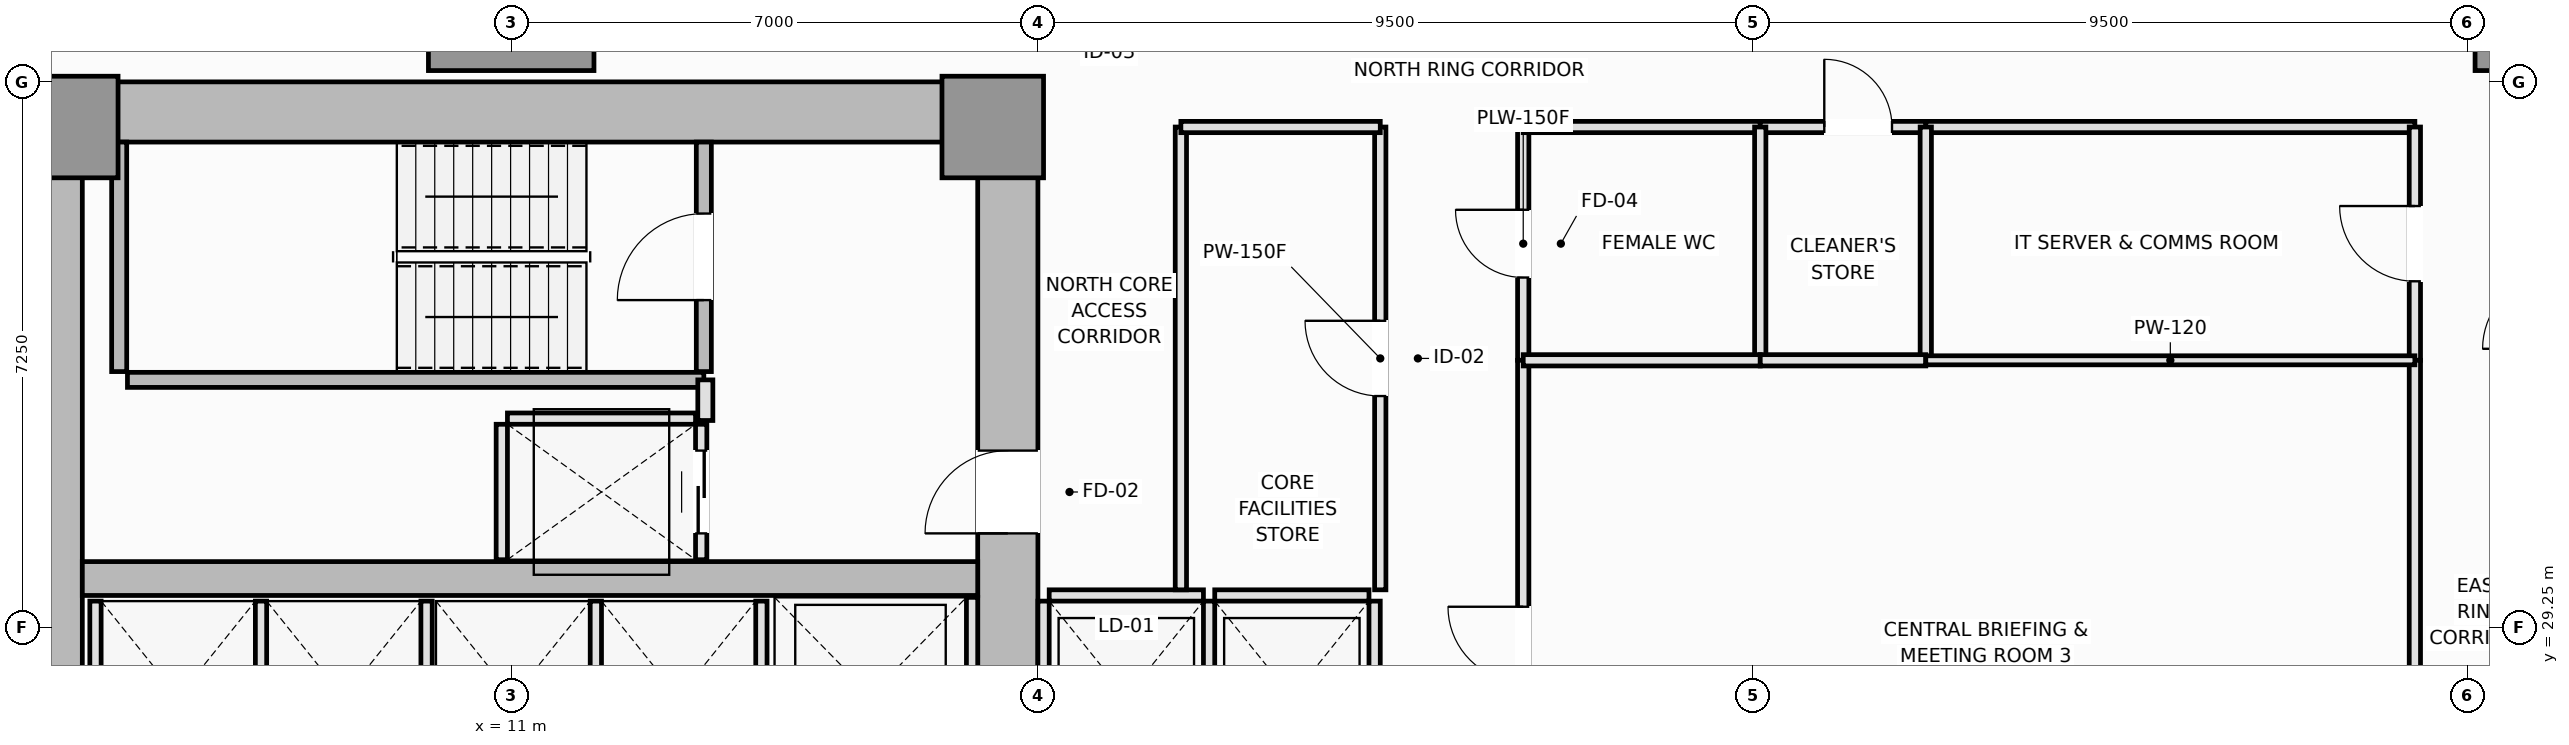
"""IFC4 building model, lengths in metres.
Left out: names, types, materials, properties, quantities, classifications, styles, units other than length and angle.
Written with IfcOpenShell. Run it as: python <this file> out.ifc"""

import sys

from ifc_helpers import new_model, si_unit, direction, frame, frame_2d, origin, origin_2d, place, context, subcontext, project, spatial, rectangle, extrude, element, fill, save


model = new_model("IFC4")
c1 = context("Model", 3, precision=1e-05, world=origin(), true_north=direction((0.0, 1.0)))
c2 = subcontext(c1, "Body", "Model", "MODEL_VIEW")
j1 = project(units=[si_unit("LENGTHUNIT", "METRE"), si_unit("PLANEANGLEUNIT", "RADIAN")], contexts=[c1])
p1 = place(None, origin())
s1 = spatial("IfcSite", under=j1, at=p1, CompositionType="ELEMENT")
p2 = place(p1, origin())
s2 = spatial("IfcBuilding", under=s1, at=p2, CompositionType="ELEMENT")
p3 = place(p2, frame((0.0, 0.0, 64.65)))
s3 = spatial("IfcBuildingStorey", under=s2, at=p3, CompositionType="ELEMENT", Elevation=64.65)
p4 = place(p3, frame((4.5, 36.1, 0.0), z_axis=(0.0, 0.0, 1.0), x_axis=(1.0, 0.0, 0.0)))
e1 = element("IfcWall", 1, at=p4, inside=s3, PredefinedType="SHEAR", context=c2, shape_type="SweptSolid", body=[
    extrude(rectangle(XDim=13.5, YDim=0.8, at=frame_2d((6.75, 0.0))), origin(), (0.0, 0.0, 1.0), 3.55),
])
p5 = place(p3, frame((4.9, 14.8, 0.0), z_axis=(0.0, 0.0, 1.0), x_axis=(0.0, 1.0, 0.0)))
e2 = element("IfcWall", 2, at=p5, inside=s3, PredefinedType="SHEAR", context=c2, shape_type="SweptSolid", body=[
    extrude(rectangle(XDim=20.9, YDim=0.8, at=frame_2d((10.45, 0.0))), origin(), (0.0, 0.0, 1.0), 3.55),
])
p6 = place(p3, frame((17.6, 27.05, 0.0), z_axis=(0.0, 0.0, 1.0), x_axis=(0.0, 1.0, 0.0)))
e3 = element("IfcWall", 3, at=p6, inside=s3, PredefinedType="SHEAR", context=c2, shape_type="SweptSolid", body=[
    extrude(rectangle(XDim=8.65, YDim=0.8, at=frame_2d((4.325, 0.0))), origin(), (0.0, 0.0, 1.0), 3.55),
])
p7 = place(p6, frame((3.45, 0.0, 0.0)))
e4 = element("IfcOpeningElement", 4, at=p7, cuts=e3, PredefinedType="OPENING", context=c2, shape_type="SweptSolid", body=[
    extrude(rectangle(XDim=1.1, YDim=2.15, at=frame_2d((0.55, 1.075))), frame((0.0, 0.41, 0.0), z_axis=(0.0, -1.0, 0.0), x_axis=(1.0, 0.0, 0.0)), (0.0, 0.0, 1.0), 0.82),
])
p8 = place(p3, frame((5.3, 29.9, 0.0), z_axis=(0.0, 0.0, 1.0), x_axis=(1.0, 0.0, 0.0)))
e5 = element("IfcWall", 5, at=p8, inside=s3, PredefinedType="SHEAR", context=c2, shape_type="SweptSolid", body=[
    extrude(rectangle(XDim=11.9, YDim=0.45, at=frame_2d((5.95, 0.0))), origin(), (0.0, 0.0, 1.0), 3.55),
])
for number, where, z_axis, x_axis in (
    (6, (5.1, 35.9, 0.0), (0.0, 0.0, 1.0), (1.0, 0.0, 0.0)),
    (7, (17.4, 35.9, 0.0), (0.0, 0.0, 1.0), (1.0, 0.0, 0.0)),
):
    element("IfcColumn", number, at=place(p3, frame(where, z_axis=z_axis, x_axis=x_axis)), inside=s3, PredefinedType="PILASTER", context=c2, shape_type="SweptSolid", body=[
        extrude(rectangle(XDim=1.35, YDim=1.35, at=origin_2d()), origin(), (0.0, 0.0, 1.0), 3.55),
    ])
for number, where, z_axis, x_axis in (
    (8, (11.0, 37.75, 0.0), (0.0, 0.0, 1.0), (1.0, 0.0, 0.0)),
    (9, (38.2, 37.75, 0.0), (0.0, 0.0, 1.0), (1.0, 0.0, 0.0)),
):
    element("IfcColumn", number, at=place(p3, frame(where, z_axis=z_axis, x_axis=x_axis)), inside=s3, PredefinedType="COLUMN", context=c2, shape_type="SweptSolid", body=[
        extrude(rectangle(XDim=2.2, YDim=2.2, at=origin_2d()), origin(), (0.0, 0.0, 1.0), 3.55),
    ])
p9 = place(p3, frame((5.79, 32.65, 0.0), z_axis=(0.0, 0.0, 1.0), x_axis=(0.0, 1.0, 0.0)))
e10 = element("IfcWall", 10, at=p9, inside=s3, PredefinedType="SOLIDWALL", context=c2, shape_type="SweptSolid", body=[
    extrude(rectangle(XDim=3.05, YDim=0.2, at=frame_2d((1.525, 0.0))), origin(), (0.0, 0.0, 1.0), 3.55),
])
p10 = place(p3, frame((5.9, 32.54, 0.0), z_axis=(0.0, 0.0, 1.0), x_axis=(1.0, 0.0, 0.0)))
e11 = element("IfcWall", 11, at=p10, inside=s3, PredefinedType="SOLIDWALL", context=c2, shape_type="SweptSolid", body=[
    extrude(rectangle(XDim=7.66, YDim=0.2, at=frame_2d((3.83, 0.0))), origin(), (0.0, 0.0, 1.0), 3.55),
])
p11 = place(p3, frame((13.56, 32.65, 0.0), z_axis=(0.0, 0.0, 1.0), x_axis=(0.0, 1.0, 0.0)))
e12 = element("IfcWall", 12, at=p11, inside=s3, PredefinedType="SOLIDWALL", context=c2, shape_type="SweptSolid", body=[
    extrude(rectangle(XDim=3.05, YDim=0.2, at=frame_2d((1.525, 0.0))), origin(), (0.0, 0.0, 1.0), 3.55),
])
p12 = place(p11, frame((0.95, 0.0, 0.0)))
e13 = element("IfcOpeningElement", 13, at=p12, cuts=e12, PredefinedType="OPENING", context=c2, shape_type="SweptSolid", body=[
    extrude(rectangle(XDim=1.15, YDim=2.15, at=frame_2d((0.575, 1.075))), frame((0.0, 0.11, 0.0), z_axis=(0.0, -1.0, 0.0), x_axis=(1.0, 0.0, 0.0)), (0.0, 0.0, 1.0), 0.22),
])
p13 = place(p3, frame((18.15, 29.675, 0.0), z_axis=(0.0, 0.0, 1.0), x_axis=(1.0, 0.0, 0.0)))
e14 = element("IfcWall", 14, at=p13, inside=s3, PredefinedType="PARTITIONING", context=c2, shape_type="SweptSolid", body=[
    extrude(rectangle(XDim=2.05, YDim=0.15, at=frame_2d((1.025, 0.0))), origin(), (0.0, 0.0, 1.0), 3.37),
])
for number, where, z_axis, x_axis in (
    (15, (18.075, 27.05, 0.0), (0.0, 0.0, 1.0), (0.0, 1.0, 0.0)),
    (16, (20.275, 27.05, 0.0), (0.0, 0.0, 1.0), (0.0, 1.0, 0.0)),
):
    element("IfcWall", number, at=place(p3, frame(where, z_axis=z_axis, x_axis=x_axis)), inside=s3, PredefinedType="PARTITIONING", context=c2, shape_type="SweptSolid", body=[
        extrude(rectangle(XDim=2.55, YDim=0.15, at=frame_2d((1.275, 0.0))), origin(), (0.0, 0.0, 1.0), 3.37),
    ])
p14 = place(p3, frame((20.35, 29.675, 0.0), z_axis=(0.0, 0.0, 1.0), x_axis=(1.0, 0.0, 0.0)))
e17 = element("IfcWall", 17, at=p14, inside=s3, PredefinedType="PARTITIONING", context=c2, shape_type="SweptSolid", body=[
    extrude(rectangle(XDim=2.05, YDim=0.15, at=frame_2d((1.025, 0.0))), origin(), (0.0, 0.0, 1.0), 3.37),
])
for number, where, z_axis, x_axis in (
    (18, (22.475, 27.05, 0.0), (0.0, 0.0, 1.0), (0.0, 1.0, 0.0)),
    (19, (5.475, 27.05, 0.0), (0.0, 0.0, 1.0), (0.0, 1.0, 0.0)),
    (20, (7.675, 27.05, 0.0), (0.0, 0.0, 1.0), (0.0, 1.0, 0.0)),
    (21, (9.875, 27.05, 0.0), (0.0, 0.0, 1.0), (0.0, 1.0, 0.0)),
    (22, (12.125, 27.05, 0.0), (0.0, 0.0, 1.0), (0.0, 1.0, 0.0)),
    (23, (14.325, 27.05, 0.0), (0.0, 0.0, 1.0), (0.0, 1.0, 0.0)),
):
    element("IfcWall", number, at=place(p3, frame(where, z_axis=z_axis, x_axis=x_axis)), inside=s3, PredefinedType="PARTITIONING", context=c2, shape_type="SweptSolid", body=[
        extrude(rectangle(XDim=2.55, YDim=0.15, at=frame_2d((1.275, 0.0))), origin(), (0.0, 0.0, 1.0), 3.37),
    ])
p15 = place(p3, frame((17.125, 27.05, 0.0), z_axis=(0.0, 0.0, 1.0), x_axis=(0.0, 1.0, 0.0)))
e24 = element("IfcWall", 24, at=p15, inside=s3, PredefinedType="PARTITIONING", context=c2, shape_type="SweptSolid", body=[
    extrude(rectangle(XDim=2.6, YDim=0.15, at=frame_2d((1.3, 0.0))), origin(), (0.0, 0.0, 1.0), 3.37),
])
p16 = place(p3, frame((10.95, 32.025, 0.0), z_axis=(0.0, 0.0, 1.0), x_axis=(1.0, 0.0, 0.0)))
e25 = element("IfcWall", 25, at=p16, inside=s3, PredefinedType="PARTITIONING", context=c2, shape_type="SweptSolid", body=[
    extrude(rectangle(XDim=2.5, YDim=0.15, at=frame_2d((1.25, 0.0))), origin(), (0.0, 0.0, 1.0), 3.37),
])
p17 = place(p3, frame((10.875, 30.15, 0.0), z_axis=(0.0, 0.0, 1.0), x_axis=(0.0, 1.0, 0.0)))
e26 = element("IfcWall", 26, at=p17, inside=s3, PredefinedType="PARTITIONING", context=c2, shape_type="SweptSolid", body=[
    extrude(rectangle(XDim=1.8, YDim=0.15, at=frame_2d((0.9, 0.0))), origin(), (0.0, 0.0, 1.0), 3.37),
])
p18 = place(p3, frame((13.525, 30.15, 0.0), z_axis=(0.0, 0.0, 1.0), x_axis=(0.0, 1.0, 0.0)))
e27 = element("IfcWall", 27, at=p18, inside=s3, PredefinedType="PARTITIONING", context=c2, shape_type="SweptSolid", body=[
    extrude(rectangle(XDim=1.8, YDim=0.15, at=frame_2d((0.9, 0.0))), origin(), (0.0, 0.0, 1.0), 3.37),
])
p19 = place(p18, frame((0.35, 0.0, 0.0)))
e28 = element("IfcOpeningElement", 28, at=p19, cuts=e27, PredefinedType="OPENING", context=c2, shape_type="SweptSolid", body=[
    extrude(rectangle(XDim=1.1, YDim=2.2, at=frame_2d((0.55, 1.1))), frame((0.0, 0.085, 0.0), z_axis=(0.0, -1.0, 0.0), x_axis=(1.0, 0.0, 0.0)), (0.0, 0.0, 1.0), 0.17),
])
p20 = place(p3, frame((13.58, 32.0, 0.0), z_axis=(0.0, 0.0, 1.0), x_axis=(0.0, 1.0, 0.0)))
e29 = element("IfcWall", 29, at=p20, inside=s3, PredefinedType="PARTITIONING", context=c2, shape_type="SweptSolid", body=[
    extrude(rectangle(XDim=0.54, YDim=0.2, at=frame_2d((0.27, 0.0))), origin(), (0.0, 0.0, 1.0), 3.37),
])
p21 = place(p3, frame((22.55, 29.75, 0.0), z_axis=(0.0, 0.0, 1.0), x_axis=(0.0, 1.0, 0.0)))
e30 = element("IfcWall", 30, at=p21, inside=s3, PredefinedType="PARTITIONING", context=c2, shape_type="SweptSolid", body=[
    extrude(rectangle(XDim=6.15, YDim=0.15, at=frame_2d((3.075, 0.0))), origin(), (0.0, 0.0, 1.0), 3.01),
])
p22 = place(p21, frame((2.575, 0.0, 0.0)))
e31 = element("IfcOpeningElement", 31, at=p22, cuts=e30, PredefinedType="OPENING", context=c2, shape_type="SweptSolid", body=[
    extrude(rectangle(XDim=1.0, YDim=2.15, at=frame_2d((0.5, 1.075))), frame((0.0, 0.085, 0.0), z_axis=(0.0, -1.0, 0.0), x_axis=(1.0, 0.0, 0.0)), (0.0, 0.0, 1.0), 0.17),
])
p23 = place(p3, frame((24.45, 32.8, 0.0), z_axis=(0.0, 0.0, 1.0), x_axis=(0.0, 1.0, 0.0)))
e32 = element("IfcWall", 32, at=p23, inside=s3, PredefinedType="PLUMBINGWALL", context=c2, shape_type="SweptSolid", body=[
    extrude(rectangle(XDim=3.1, YDim=0.15, at=frame_2d((1.55, 0.0))), origin(), (0.0, 0.0, 1.0), 3.37),
])
p24 = place(p23, frame((1.1, 0.0, 0.0)))
e33 = element("IfcOpeningElement", 33, at=p24, cuts=e32, PredefinedType="OPENING", context=c2, shape_type="SweptSolid", body=[
    extrude(rectangle(XDim=0.9, YDim=2.1, at=frame_2d((0.45, 1.05))), frame((0.0, 0.085, 0.0), z_axis=(0.0, -1.0, 0.0), x_axis=(1.0, 0.0, 0.0)), (0.0, 0.0, 1.0), 0.17),
])
p25 = place(p3, frame((24.45, 25.25, 0.0), z_axis=(0.0, 0.0, 1.0), x_axis=(0.0, 1.0, 0.0)))
e34 = element("IfcWall", 34, at=p25, inside=s3, PredefinedType="PARTITIONING", context=c2, shape_type="SweptSolid", body=[
    extrude(rectangle(XDim=7.55, YDim=0.15, at=frame_2d((3.775, 0.0))), origin(), (0.0, 0.0, 1.0), 3.37),
])
p26 = place(p25, frame((3.275, 0.0, 0.0)))
e35 = element("IfcOpeningElement", 35, at=p26, cuts=e34, PredefinedType="OPENING", context=c2, shape_type="SweptSolid", body=[
    extrude(rectangle(XDim=1.0, YDim=2.15, at=frame_2d((0.5, 1.075))), frame((0.0, 0.085, 0.0), z_axis=(0.0, -1.0, 0.0), x_axis=(1.0, 0.0, 0.0)), (0.0, 0.0, 1.0), 0.17),
])
p27 = place(p3, frame((19.9, 29.75, 0.0), z_axis=(0.0, 0.0, 1.0), x_axis=(0.0, 1.0, 0.0)))
e36 = element("IfcWall", 36, at=p27, inside=s3, PredefinedType="PARTITIONING", context=c2, shape_type="SweptSolid", body=[
    extrude(rectangle(XDim=6.15, YDim=0.15, at=frame_2d((3.075, 0.0))), origin(), (0.0, 0.0, 1.0), 3.37),
])
p28 = place(p3, frame((19.9, 35.9, 0.0), z_axis=(0.0, 0.0, 1.0), x_axis=(1.0, 0.0, 0.0)))
e37 = element("IfcWall", 37, at=p28, inside=s3, PredefinedType="PARTITIONING", context=c2, shape_type="SweptSolid", body=[
    extrude(rectangle(XDim=2.65, YDim=0.15, at=frame_2d((1.325, 0.0))), origin(), (0.0, 0.0, 1.0), 3.37),
])
p29 = place(p3, frame((24.45, 35.9, 0.0), z_axis=(0.0, 0.0, 1.0), x_axis=(1.0, 0.0, 0.0)))
e38 = element("IfcWall", 38, at=p29, inside=s3, PredefinedType="PLUMBINGWALL", context=c2, shape_type="SweptSolid", body=[
    extrude(rectangle(XDim=3.15, YDim=0.15, at=frame_2d((1.575, 0.0))), origin(), (0.0, 0.0, 1.0), 3.37),
])
p30 = place(p3, frame((27.6, 35.9, 0.0), z_axis=(0.0, 0.0, 1.0), x_axis=(1.0, 0.0, 0.0)))
e39 = element("IfcWall", 39, at=p30, inside=s3, PredefinedType="PLUMBINGWALL", context=c2, shape_type="SweptSolid", body=[
    extrude(rectangle(XDim=2.2, YDim=0.15, at=frame_2d((1.1, 0.0))), origin(), (0.0, 0.0, 1.0), 3.37),
])
p31 = place(p30, frame((0.851, 0.0, 0.0)))
e40 = element("IfcOpeningElement", 40, at=p31, cuts=e39, PredefinedType="OPENING", context=c2, shape_type="SweptSolid", body=[
    extrude(rectangle(XDim=0.9, YDim=2.1, at=frame_2d((0.45, 1.05))), frame((0.0, 0.085, 0.0), z_axis=(0.0, -1.0, 0.0), x_axis=(1.0, 0.0, 0.0)), (0.0, 0.0, 1.0), 0.17),
])
p32 = place(p3, frame((29.8, 35.9, 0.0), z_axis=(0.0, 0.0, 1.0), x_axis=(1.0, 0.0, 0.0)))
e41 = element("IfcWall", 41, at=p32, inside=s3, PredefinedType="PARTITIONING", context=c2, shape_type="SweptSolid", body=[
    extrude(rectangle(XDim=6.5, YDim=0.15, at=frame_2d((3.25, 0.0))), origin(), (0.0, 0.0, 1.0), 3.37),
])
p33 = place(p3, frame((36.3, 32.8, 0.0), z_axis=(0.0, 0.0, 1.0), x_axis=(0.0, 1.0, 0.0)))
e42 = element("IfcWall", 42, at=p33, inside=s3, PredefinedType="PARTITIONING", context=c2, shape_type="SweptSolid", body=[
    extrude(rectangle(XDim=3.1, YDim=0.15, at=frame_2d((1.55, 0.0))), origin(), (0.0, 0.0, 1.0), 3.37),
])
p34 = place(p33, frame((1.05, 0.0, 0.0)))
e43 = element("IfcOpeningElement", 43, at=p34, cuts=e42, PredefinedType="OPENING", context=c2, shape_type="SweptSolid", body=[
    extrude(rectangle(XDim=1.0, YDim=2.15, at=frame_2d((0.5, 1.075))), frame((0.0, 0.085, 0.0), z_axis=(0.0, -1.0, 0.0), x_axis=(1.0, 0.0, 0.0)), (0.0, 0.0, 1.0), 0.17),
])
p35 = place(p3, frame((36.3, 25.25, 0.0), z_axis=(0.0, 0.0, 1.0), x_axis=(0.0, 1.0, 0.0)))
e44 = element("IfcWall", 44, at=p35, inside=s3, PredefinedType="PARTITIONING", context=c2, shape_type="SweptSolid", body=[
    extrude(rectangle(XDim=7.55, YDim=0.15, at=frame_2d((3.775, 0.0))), origin(), (0.0, 0.0, 1.0), 3.37),
])
p36 = place(p3, frame((27.6, 32.8, 0.0), z_axis=(0.0, 0.0, 1.0), x_axis=(0.0, 1.0, 0.0)))
e45 = element("IfcWall", 45, at=p36, inside=s3, PredefinedType="PLUMBINGWALL", context=c2, shape_type="SweptSolid", body=[
    extrude(rectangle(XDim=3.1, YDim=0.15, at=frame_2d((1.55, 0.0))), origin(), (0.0, 0.0, 1.0), 3.37),
])
p37 = place(p3, frame((24.45, 32.8, 0.0), z_axis=(0.0, 0.0, 1.0), x_axis=(1.0, 0.0, 0.0)))
e46 = element("IfcWall", 46, at=p37, inside=s3, PredefinedType="PLUMBINGWALL", context=c2, shape_type="SweptSolid", body=[
    extrude(rectangle(XDim=3.15, YDim=0.15, at=frame_2d((1.575, 0.0))), origin(), (0.0, 0.0, 1.0), 3.37),
])
p38 = place(p3, frame((29.8, 32.8, 0.0), z_axis=(0.0, 0.0, 1.0), x_axis=(0.0, 1.0, 0.0)))
e47 = element("IfcWall", 47, at=p38, inside=s3, PredefinedType="PLUMBINGWALL", context=c2, shape_type="SweptSolid", body=[
    extrude(rectangle(XDim=3.1, YDim=0.15, at=frame_2d((1.55, 0.0))), origin(), (0.0, 0.0, 1.0), 3.37),
])
p39 = place(p3, frame((27.6, 32.8, 0.0), z_axis=(0.0, 0.0, 1.0), x_axis=(1.0, 0.0, 0.0)))
e48 = element("IfcWall", 48, at=p39, inside=s3, PredefinedType="PLUMBINGWALL", context=c2, shape_type="SweptSolid", body=[
    extrude(rectangle(XDim=2.2, YDim=0.15, at=frame_2d((1.1, 0.0))), origin(), (0.0, 0.0, 1.0), 3.37),
])
p40 = place(p3, frame((29.8, 32.8, 0.0), z_axis=(0.0, 0.0, 1.0), x_axis=(1.0, 0.0, 0.0)))
e49 = element("IfcWall", 49, at=p40, inside=s3, PredefinedType="PARTITIONING", context=c2, shape_type="SweptSolid", body=[
    extrude(rectangle(XDim=6.5, YDim=0.12, at=frame_2d((3.25, 0.0))), origin(), (0.0, 0.0, 1.0), 3.37),
])
p41 = place(p12, origin())
e50 = element("IfcDoor", 50, at=p41, inside=s3, OperationType="SINGLE_SWING_LEFT", PredefinedType="DOOR", context=c2, shape_type="SweptSolid", body=[
    extrude(rectangle(XDim=1.15, YDim=2.15, at=frame_2d((0.575, 1.075))), frame((0.0, 0.025, 0.0), z_axis=(0.0, -1.0, 0.0), x_axis=(1.0, 0.0, 0.0)), (0.0, 0.0, 1.0), 0.05),
])
fill(e13, e50)
p42 = place(p19, origin())
e51 = element("IfcDoor", 51, at=p42, inside=s3, OperationType="DOUBLE_DOOR_SLIDING", PredefinedType="DOOR", context=c2, shape_type="SweptSolid", body=[
    extrude(rectangle(XDim=1.1, YDim=2.2, at=frame_2d((0.55, 1.1))), frame((0.0, 0.025, 0.0), z_axis=(0.0, -1.0, 0.0), x_axis=(1.0, 0.0, 0.0)), (0.0, 0.0, 1.0), 0.05),
])
fill(e28, e51)
p43 = place(p7, origin())
e52 = element("IfcDoor", 52, at=p43, inside=s3, OperationType="SINGLE_SWING_LEFT", PredefinedType="DOOR", context=c2, shape_type="SweptSolid", body=[
    extrude(rectangle(XDim=1.1, YDim=2.15, at=frame_2d((0.55, 1.075))), frame((0.0, 0.025, 0.0), z_axis=(0.0, -1.0, 0.0), x_axis=(1.0, 0.0, 0.0)), (0.0, 0.0, 1.0), 0.05),
])
fill(e4, e52)
p44 = place(p22, origin())
e53 = element("IfcDoor", 53, at=p44, inside=s3, OperationType="SINGLE_SWING_RIGHT", PredefinedType="DOOR", context=c2, shape_type="SweptSolid", body=[
    extrude(rectangle(XDim=1.0, YDim=2.15, at=frame_2d((0.5, 1.075))), frame((0.0, 0.025, 0.0), z_axis=(0.0, -1.0, 0.0), x_axis=(1.0, 0.0, 0.0)), (0.0, 0.0, 1.0), 0.05),
])
fill(e31, e53)
p45 = place(p24, origin())
e54 = element("IfcDoor", 54, at=p45, inside=s3, OperationType="SINGLE_SWING_RIGHT", PredefinedType="DOOR", context=c2, shape_type="SweptSolid", body=[
    extrude(rectangle(XDim=0.9, YDim=2.1, at=frame_2d((0.45, 1.05))), frame((0.0, 0.025, 0.0), z_axis=(0.0, -1.0, 0.0), x_axis=(1.0, 0.0, 0.0)), (0.0, 0.0, 1.0), 0.05),
])
fill(e33, e54)
p46 = place(p26, origin())
e55 = element("IfcDoor", 55, at=p46, inside=s3, OperationType="SINGLE_SWING_RIGHT", PredefinedType="DOOR", context=c2, shape_type="SweptSolid", body=[
    extrude(rectangle(XDim=1.0, YDim=2.15, at=frame_2d((0.5, 1.075))), frame((0.0, 0.025, 0.0), z_axis=(0.0, -1.0, 0.0), x_axis=(1.0, 0.0, 0.0)), (0.0, 0.0, 1.0), 0.05),
])
fill(e35, e55)
p47 = place(p31, origin())
e56 = element("IfcDoor", 56, at=p47, inside=s3, OperationType="SINGLE_SWING_LEFT", PredefinedType="DOOR", context=c2, shape_type="SweptSolid", body=[
    extrude(rectangle(XDim=0.9, YDim=2.1, at=frame_2d((0.45, 1.05))), frame((0.0, 0.025, 0.0), z_axis=(0.0, -1.0, 0.0), x_axis=(1.0, 0.0, 0.0)), (0.0, 0.0, 1.0), 0.05),
])
fill(e40, e56)
p48 = place(p34, origin())
e57 = element("IfcDoor", 57, at=p48, inside=s3, OperationType="SINGLE_SWING_RIGHT", PredefinedType="DOOR", context=c2, shape_type="SweptSolid", body=[
    extrude(rectangle(XDim=1.0, YDim=2.15, at=frame_2d((0.5, 1.075))), frame((0.0, 0.025, 0.0), z_axis=(0.0, -1.0, 0.0), x_axis=(1.0, 0.0, 0.0)), (0.0, 0.0, 1.0), 0.05),
])
fill(e43, e57)
save(model, sys.argv[1])
